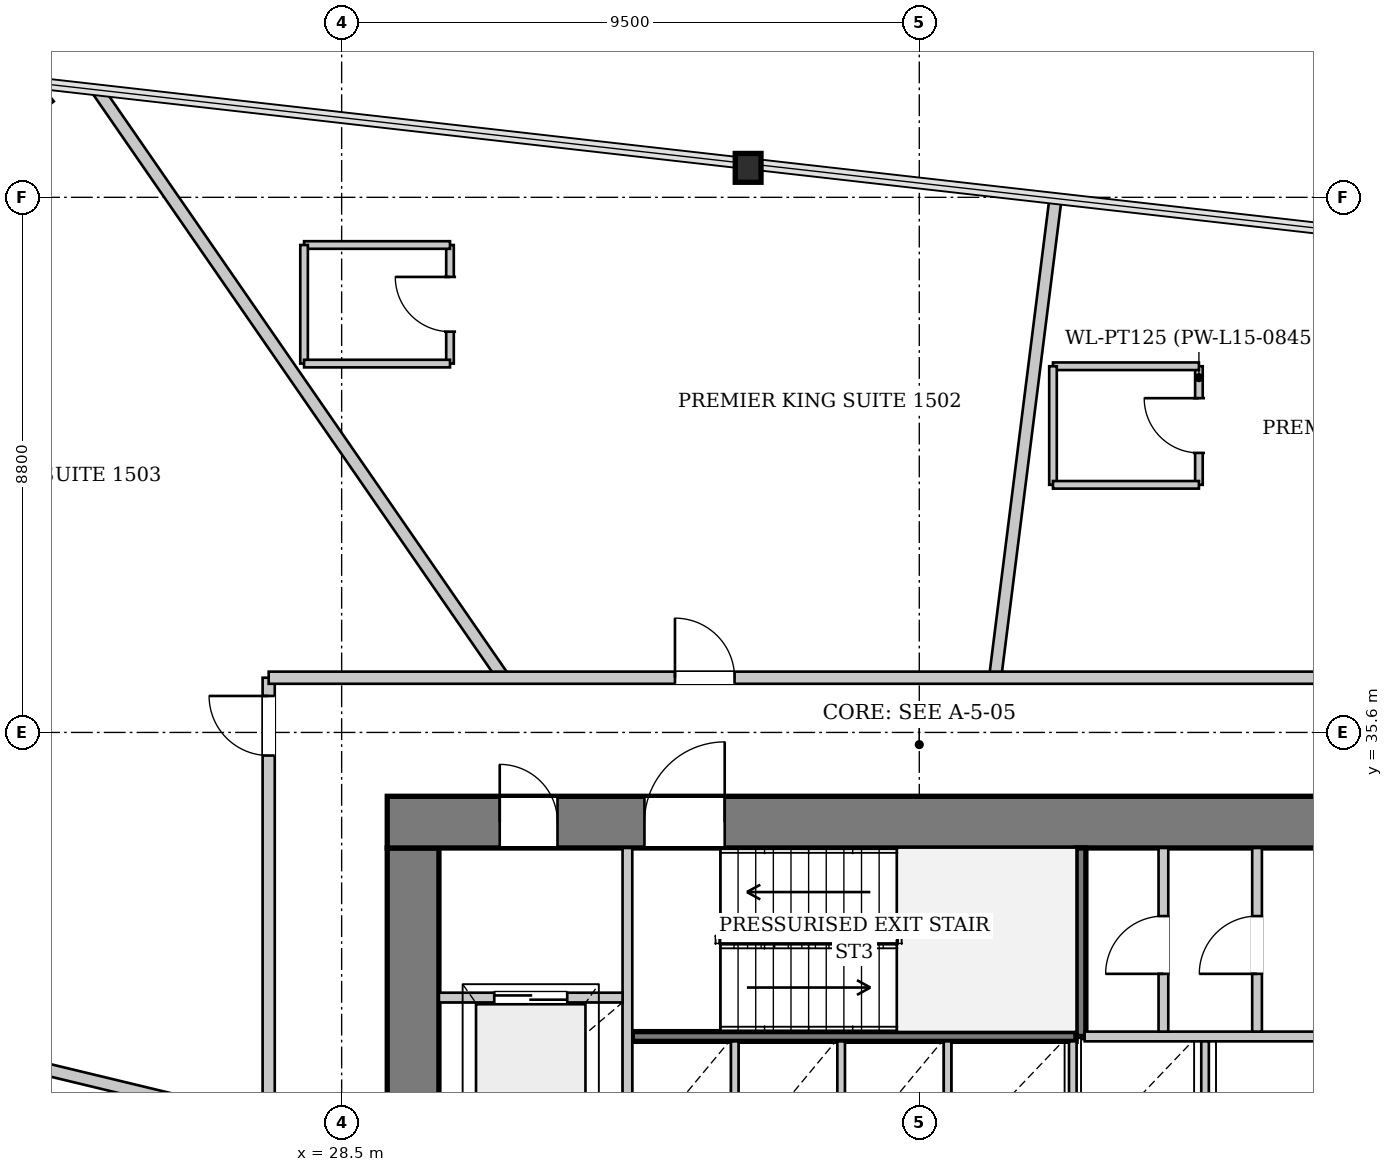
"""IFC4 building model, lengths in metres.
Left out: names, types, materials, properties, quantities, classifications, styles, units other than length and angle.
Written with IfcOpenShell. Run it as: python <this file> out.ifc"""

import sys

from ifc_helpers import new_model, si_unit, direction, frame, frame_2d, origin, origin_2d, place, context, subcontext, project, spatial, rectangle, i_section, extrude, source, transform, mapped, element, fill, save


model = new_model("IFC4")
c1 = context("Model", 3, precision=1e-05, world=origin(), true_north=direction((0.0, 1.0)))
c2 = subcontext(c1, "Body", "Model", "MODEL_VIEW")
j1 = project(units=[si_unit("LENGTHUNIT", "METRE"), si_unit("PLANEANGLEUNIT", "RADIAN")], contexts=[c1])
p1 = place(None, origin())
s1 = spatial("IfcSite", under=j1, at=p1, CompositionType="ELEMENT")
p2 = place(p1, origin())
s2 = spatial("IfcBuilding", under=s1, at=p2, CompositionType="ELEMENT")
p3 = place(p2, frame((0.0, 0.0, 61.25)))
s3 = spatial("IfcBuildingStorey", under=s2, at=p3, CompositionType="ELEMENT", Elevation=61.25)
m1 = source(origin(), c2, "Body", "SweptSolid", [
    extrude(i_section(OverallWidth=0.424, OverallDepth=0.474, WebThickness=0.043, FlangeThickness=0.068, at=origin_2d()), origin(), (0.0, 0.0, 1.0), 3.4),
])
p4 = place(p3, frame((35.336, 44.936, 0.0), z_axis=(-0.088823484201, -0.030373754096, 0.995584162046), x_axis=(0.323561533003, -0.946207130792, 0.0)))
e1 = element("IfcColumn", 1, at=p4, inside=s3, PredefinedType="COLUMN", context=c2, shape_type="MappedRepresentation", body=[
    mapped(m1, transform((0.0, 0.0, 0.0), x_axis=(1.0, 0.0, 0.0), y_axis=(0.0, 1.0, 0.0), z_axis=(0.0, 0.0, 1.0), scale=1.0)),
])
m2 = source(origin(), c2, "Body", "SweptSolid", [
    extrude(i_section(OverallWidth=0.308, OverallDepth=0.814, WebThickness=0.021, FlangeThickness=0.04, at=origin_2d()), origin(), (0.0, 0.0, 1.0), 3.409),
])
p5 = place(p3, frame((23.527, 46.274, 0.0), z_axis=(-0.088944570663, -0.078632156673, 0.99292791646), x_axis=(0.662339568737, -0.749203774473, 0.0)))
e2 = element("IfcColumn", 2, at=p5, inside=s3, PredefinedType="COLUMN", context=c2, shape_type="MappedRepresentation", body=[
    mapped(m2, transform((0.0, 0.0, 0.0), x_axis=(1.0, 0.0, 0.0), y_axis=(0.0, 1.0, 0.0), z_axis=(0.0, 0.0, 1.0), scale=1.0)),
])
p6 = place(p3, frame((18.817, 42.229, 0.0), z_axis=(0.0, 0.0, 1.0), x_axis=(0.778217687349, 0.627994610722, 0.0)))
e3 = element("IfcWall", 3, at=p6, inside=s3, PredefinedType="SOLIDWALL", context=c2, shape_type="SweptSolid", body=[
    extrude(rectangle(XDim=6.207, YDim=0.38, at=frame_2d((3.103, 0.0))), origin(), (0.0, 0.0, 1.0), 2.592),
])
p7 = place(p3, frame((29.675, 19.5, 0.0), z_axis=(0.0, 0.0, 1.0), x_axis=(0.0, 1.0, 0.0)))
e4 = element("IfcWall", 4, at=p7, inside=s3, PredefinedType="SHEAR", context=c2, shape_type="SweptSolid", body=[
    extrude(rectangle(XDim=14.2, YDim=0.85, at=frame_2d((7.1, 0.0))), origin(), (0.0, 0.0, 1.0), 3.3),
])
p8 = place(p7, frame((7.42, 0.0, 0.0)))
e5 = element("IfcOpeningElement", 5, at=p8, cuts=e4, PredefinedType="OPENING", context=c2, shape_type="SweptSolid", body=[
    extrude(rectangle(XDim=1.6, YDim=2.2, at=frame_2d((0.8, 1.1))), frame((0.0, 0.435, 0.0), z_axis=(0.0, -1.0, 0.0), x_axis=(1.0, 0.0, 0.0)), (0.0, 0.0, 1.0), 0.87),
])
p9 = place(p3, frame((29.25, 34.125, 0.0), z_axis=(0.0, 0.0, 1.0), x_axis=(1.0, 0.0, 0.0)))
e6 = element("IfcWall", 6, at=p9, inside=s3, PredefinedType="SHEAR", context=c2, shape_type="SweptSolid", body=[
    extrude(rectangle(XDim=17.5, YDim=0.85, at=frame_2d((8.75, 0.0))), origin(), (0.0, 0.0, 1.0), 3.3),
])
p10 = place(p9, frame((1.85, 0.0, 0.0)))
e7 = element("IfcOpeningElement", 7, at=p10, cuts=e6, PredefinedType="OPENING", context=c2, shape_type="SweptSolid", body=[
    extrude(rectangle(XDim=0.95, YDim=2.1, at=frame_2d((0.475, 1.05))), frame((0.0, 0.435, 0.0), z_axis=(0.0, -1.0, 0.0), x_axis=(1.0, 0.0, 0.0)), (0.0, 0.0, 1.0), 0.87),
])
p11 = place(p9, frame((4.23, 0.0, 0.0)))
e8 = element("IfcOpeningElement", 8, at=p11, cuts=e6, PredefinedType="OPENING", context=c2, shape_type="SweptSolid", body=[
    extrude(rectangle(XDim=1.32, YDim=2.2, at=frame_2d((0.66, 1.1))), frame((0.0, 0.435, 0.0), z_axis=(0.0, -1.0, 0.0), x_axis=(1.0, 0.0, 0.0)), (0.0, 0.0, 1.0), 0.87),
])
p12 = place(p9, frame((15.3, 0.0, 0.0)))
e9 = element("IfcOpeningElement", 9, at=p12, cuts=e6, PredefinedType="OPENING", context=c2, shape_type="SweptSolid", body=[
    extrude(rectangle(XDim=0.95, YDim=2.1, at=frame_2d((0.475, 1.05))), frame((0.0, 0.435, 0.0), z_axis=(0.0, -1.0, 0.0), x_axis=(1.0, 0.0, 0.0)), (0.0, 0.0, 1.0), 0.87),
])
p13 = place(p3, frame((33.28, 30.6, 0.0), z_axis=(0.0, 0.0, 1.0), x_axis=(1.0, 0.0, 0.0)))
e10 = element("IfcWall", 10, at=p13, inside=s3, PredefinedType="PARTITIONING", context=c2, shape_type="SweptSolid", body=[
    extrude(rectangle(XDim=7.3, YDim=0.16, at=frame_2d((3.65, 0.0))), origin(), (0.0, 0.0, 1.0), 3.3),
])
p14 = place(p3, frame((40.66, 30.6, 0.0), z_axis=(0.0, 0.0, 1.0), x_axis=(0.0, 1.0, 0.0)))
e11 = element("IfcWall", 11, at=p14, inside=s3, PredefinedType="PARTITIONING", context=c2, shape_type="SweptSolid", body=[
    extrude(rectangle(XDim=3.1, YDim=0.16, at=frame_2d((1.55, 0.0))), origin(), (0.0, 0.0, 1.0), 3.3),
])
p15 = place(p3, frame((33.2, 28.44, 0.0), z_axis=(0.0, 0.0, 1.0), x_axis=(0.0, 1.0, 0.0)))
e12 = element("IfcWall", 12, at=p15, inside=s3, PredefinedType="PARTITIONING", context=c2, shape_type="SweptSolid", body=[
    extrude(rectangle(XDim=5.26, YDim=0.16, at=frame_2d((2.63, 0.0))), origin(), (0.0, 0.0, 1.0), 3.3),
])
p16 = place(p3, frame((30.1, 31.24, 0.0), z_axis=(0.0, 0.0, 1.0), x_axis=(1.0, 0.0, 0.0)))
e13 = element("IfcWall", 13, at=p16, inside=s3, PredefinedType="PARTITIONING", context=c2, shape_type="SweptSolid", body=[
    extrude(rectangle(XDim=3.02, YDim=0.16, at=frame_2d((1.51, 0.0))), origin(), (0.0, 0.0, 1.0), 3.3),
])
p17 = place(p16, frame((0.91, 0.0, 0.0)))
e14 = element("IfcOpeningElement", 14, at=p17, cuts=e13, PredefinedType="OPENING", context=c2, shape_type="SweptSolid", body=[
    extrude(rectangle(XDim=1.2, YDim=2.2, at=frame_2d((0.6, 1.1))), frame((0.0, 0.09, 0.0), z_axis=(0.0, -1.0, 0.0), x_axis=(1.0, 0.0, 0.0)), (0.0, 0.0, 1.0), 0.18),
])
p18 = place(p3, frame((40.72, 30.6, 0.0), z_axis=(0.0, 0.0, 1.0), x_axis=(1.0, 0.0, 0.0)))
e15 = element("IfcWall", 15, at=p18, inside=s3, PredefinedType="PARTITIONING", context=c2, shape_type="SweptSolid", body=[
    extrude(rectangle(XDim=5.18, YDim=0.16, at=frame_2d((2.59, 0.0))), origin(), (0.0, 0.0, 1.0), 3.3),
])
for number, where, z_axis, x_axis in (
    (16, (34.965, 28.6, 0.0), (0.0, 0.0, 1.0), (0.0, 1.0, 0.0)),
    (17, (36.715, 28.6, 0.0), (0.0, 0.0, 1.0), (0.0, 1.0, 0.0)),
    (18, (38.465, 28.6, 0.0), (0.0, 0.0, 1.0), (0.0, 1.0, 0.0)),
    (19, (40.525, 28.6, 0.0), (0.0, 0.0, 1.0), (0.0, 1.0, 0.0)),
    (20, (42.7, 28.6, 0.0), (0.0, 0.0, 1.0), (0.0, 1.0, 0.0)),
):
    element("IfcWall", number, at=place(p3, frame(where, z_axis=z_axis, x_axis=x_axis)), inside=s3, PredefinedType="PARTITIONING", context=c2, shape_type="SweptSolid", body=[
        extrude(rectangle(XDim=1.92, YDim=0.125, at=frame_2d((0.96, 0.0))), origin(), (0.0, 0.0, 1.0), 3.3),
    ])
p19 = place(p3, frame((42.015, 30.68, 0.0), z_axis=(0.0, 0.0, 1.0), x_axis=(0.0, 1.0, 0.0)))
e21 = element("IfcWall", 21, at=p19, inside=s3, PredefinedType="PARTITIONING", context=c2, shape_type="SweptSolid", body=[
    extrude(rectangle(XDim=3.02, YDim=0.16, at=frame_2d((1.51, 0.0))), origin(), (0.0, 0.0, 1.0), 3.3),
])
p20 = place(p19, frame((0.95, 0.0, 0.0)))
e22 = element("IfcOpeningElement", 22, at=p20, cuts=e21, PredefinedType="OPENING", context=c2, shape_type="SweptSolid", body=[
    extrude(rectangle(XDim=0.95, YDim=2.1, at=frame_2d((0.475, 1.05))), frame((0.0, 0.09, 0.0), z_axis=(0.0, -1.0, 0.0), x_axis=(1.0, 0.0, 0.0)), (0.0, 0.0, 1.0), 0.18),
])
p21 = place(p3, frame((43.555, 30.68, 0.0), z_axis=(0.0, 0.0, 1.0), x_axis=(0.0, 1.0, 0.0)))
e23 = element("IfcWall", 23, at=p21, inside=s3, PredefinedType="PARTITIONING", context=c2, shape_type="SweptSolid", body=[
    extrude(rectangle(XDim=3.02, YDim=0.16, at=frame_2d((1.51, 0.0))), origin(), (0.0, 0.0, 1.0), 3.3),
])
p22 = place(p21, frame((0.95, 0.0, 0.0)))
e24 = element("IfcOpeningElement", 24, at=p22, cuts=e23, PredefinedType="OPENING", context=c2, shape_type="SweptSolid", body=[
    extrude(rectangle(XDim=0.95, YDim=2.1, at=frame_2d((0.475, 1.05))), frame((0.0, 0.09, 0.0), z_axis=(0.0, -1.0, 0.0), x_axis=(1.0, 0.0, 0.0)), (0.0, 0.0, 1.0), 0.18),
])
p23 = place(p3, frame((39.248, 36.5, 0.0), z_axis=(0.0, 0.0, 1.0), x_axis=(0.125018186773, 0.992154450162, 0.0)))
e25 = element("IfcWall", 25, at=p23, inside=s3, PredefinedType="PARTITIONING", context=c2, shape_type="SweptSolid", body=[
    extrude(rectangle(XDim=7.913, YDim=0.2, at=frame_2d((3.957, 0.0))), origin(), (0.0, 0.0, 1.0), 3.3),
])
p24 = place(p3, frame((31.161, 36.5, 0.0), z_axis=(0.0, 0.0, 1.0), x_axis=(-0.568362835672, 0.822778030229, 0.0)))
e26 = element("IfcWall", 26, at=p24, inside=s3, PredefinedType="PARTITIONING", context=c2, shape_type="SweptSolid", body=[
    extrude(rectangle(XDim=11.708, YDim=0.2, at=frame_2d((5.854, 0.0))), origin(), (0.0, 0.0, 1.0), 3.3),
])
p25 = place(p3, frame((27.3, 29.178, 0.0), z_axis=(0.0, 0.0, 1.0), x_axis=(-0.972184679764, 0.234215602453, 0.0)))
e27 = element("IfcWall", 27, at=p25, inside=s3, PredefinedType="PARTITIONING", context=c2, shape_type="SweptSolid", body=[
    extrude(rectangle(XDim=10.541, YDim=0.2, at=frame_2d((5.27, 0.0))), origin(), (0.0, 0.0, 1.0), 3.3),
])
p26 = place(p3, frame((42.599, 39.672, 0.0), z_axis=(0.0, 0.0, 1.0), x_axis=(0.0, 1.0, 0.0)))
e28 = element("IfcWall", 28, at=p26, inside=s3, PredefinedType="PARTITIONING", context=c2, shape_type="SweptSolid", body=[
    extrude(rectangle(XDim=1.95, YDim=0.125, at=frame_2d((0.975, 0.0))), origin(), (0.0, 0.0, 1.0), 3.3),
])
p27 = place(p26, frame((0.525, 0.0, 0.0)))
e29 = element("IfcOpeningElement", 29, at=p27, cuts=e28, PredefinedType="OPENING", context=c2, shape_type="SweptSolid", body=[
    extrude(rectangle(XDim=0.9, YDim=2.1, at=frame_2d((0.45, 1.05))), frame((0.0, 0.073, 0.0), z_axis=(0.0, -1.0, 0.0), x_axis=(1.0, 0.0, 0.0)), (0.0, 0.0, 1.0), 0.145),
])
p28 = place(p3, frame((42.599, 41.622, 0.0), z_axis=(0.0, 0.0, 1.0), x_axis=(-1.0, 0.0, 0.0)))
e30 = element("IfcWall", 30, at=p28, inside=s3, PredefinedType="PARTITIONING", context=c2, shape_type="SweptSolid", body=[
    extrude(rectangle(XDim=2.4, YDim=0.125, at=frame_2d((1.2, 0.0))), origin(), (0.0, 0.0, 1.0), 3.3),
])
p29 = place(p3, frame((40.199, 41.622, 0.0), z_axis=(0.0, 0.0, 1.0), x_axis=(0.0, -1.0, 0.0)))
e31 = element("IfcWall", 31, at=p29, inside=s3, PredefinedType="PARTITIONING", context=c2, shape_type="SweptSolid", body=[
    extrude(rectangle(XDim=1.95, YDim=0.125, at=frame_2d((0.975, 0.0))), origin(), (0.0, 0.0, 1.0), 3.3),
])
p30 = place(p3, frame((40.199, 39.672, 0.0), z_axis=(0.0, 0.0, 1.0), x_axis=(1.0, 0.0, 0.0)))
e32 = element("IfcWall", 32, at=p30, inside=s3, PredefinedType="PARTITIONING", context=c2, shape_type="SweptSolid", body=[
    extrude(rectangle(XDim=2.4, YDim=0.125, at=frame_2d((1.2, 0.0))), origin(), (0.0, 0.0, 1.0), 3.3),
])
p31 = place(p3, frame((30.282, 41.666, 0.0), z_axis=(0.0, 0.0, 1.0), x_axis=(0.0, 1.0, 0.0)))
e33 = element("IfcWall", 33, at=p31, inside=s3, PredefinedType="PARTITIONING", context=c2, shape_type="SweptSolid", body=[
    extrude(rectangle(XDim=1.95, YDim=0.125, at=frame_2d((0.975, 0.0))), origin(), (0.0, 0.0, 1.0), 3.3),
])
p32 = place(p31, frame((0.525, 0.0, 0.0)))
e34 = element("IfcOpeningElement", 34, at=p32, cuts=e33, PredefinedType="OPENING", context=c2, shape_type="SweptSolid", body=[
    extrude(rectangle(XDim=0.9, YDim=2.1, at=frame_2d((0.45, 1.05))), frame((0.0, 0.073, 0.0), z_axis=(0.0, -1.0, 0.0), x_axis=(1.0, 0.0, 0.0)), (0.0, 0.0, 1.0), 0.145),
])
p33 = place(p3, frame((30.282, 43.616, 0.0), z_axis=(0.0, 0.0, 1.0), x_axis=(-1.0, 0.0, 0.0)))
e35 = element("IfcWall", 35, at=p33, inside=s3, PredefinedType="PARTITIONING", context=c2, shape_type="SweptSolid", body=[
    extrude(rectangle(XDim=2.4, YDim=0.125, at=frame_2d((1.2, 0.0))), origin(), (0.0, 0.0, 1.0), 3.3),
])
p34 = place(p3, frame((27.882, 43.616, 0.0), z_axis=(0.0, 0.0, 1.0), x_axis=(0.0, -1.0, 0.0)))
e36 = element("IfcWall", 36, at=p34, inside=s3, PredefinedType="PARTITIONING", context=c2, shape_type="SweptSolid", body=[
    extrude(rectangle(XDim=1.95, YDim=0.125, at=frame_2d((0.975, 0.0))), origin(), (0.0, 0.0, 1.0), 3.3),
])
p35 = place(p3, frame((27.882, 41.666, 0.0), z_axis=(0.0, 0.0, 1.0), x_axis=(1.0, 0.0, 0.0)))
e37 = element("IfcWall", 37, at=p35, inside=s3, PredefinedType="PARTITIONING", context=c2, shape_type="SweptSolid", body=[
    extrude(rectangle(XDim=2.4, YDim=0.125, at=frame_2d((1.2, 0.0))), origin(), (0.0, 0.0, 1.0), 3.3),
])
p36 = place(p3, frame((27.3, 16.7, 0.0), z_axis=(0.0, 0.0, 1.0), x_axis=(0.0, 1.0, 0.0)))
e38 = element("IfcWall", 38, at=p36, inside=s3, PredefinedType="PARTITIONING", context=c2, shape_type="SweptSolid", body=[
    extrude(rectangle(XDim=19.8, YDim=0.2, at=frame_2d((9.9, 0.0))), origin(), (0.0, 0.0, 1.0), 3.3),
])
p37 = place(p36, frame((18.52, 0.0, 0.0)))
e39 = element("IfcOpeningElement", 39, at=p37, cuts=e38, PredefinedType="OPENING", context=c2, shape_type="SweptSolid", body=[
    extrude(rectangle(XDim=0.98, YDim=2.15, at=frame_2d((0.49, 1.075))), frame((0.0, 0.11, 0.0), z_axis=(0.0, -1.0, 0.0), x_axis=(1.0, 0.0, 0.0)), (0.0, 0.0, 1.0), 0.22),
])
p38 = place(p36, frame((9.047, 0.0, 0.0)))
e40 = element("IfcOpeningElement", 40, at=p38, cuts=e38, PredefinedType="OPENING", context=c2, shape_type="SweptSolid", body=[
    extrude(rectangle(XDim=0.98, YDim=2.15, at=frame_2d((0.49, 1.075))), frame((0.0, 0.11, 0.0), z_axis=(0.0, -1.0, 0.0), x_axis=(1.0, 0.0, 0.0)), (0.0, 0.0, 1.0), 0.22),
])
p39 = place(p36, frame((0.3, 0.0, 0.0)))
e41 = element("IfcOpeningElement", 41, at=p39, cuts=e38, PredefinedType="OPENING", context=c2, shape_type="SweptSolid", body=[
    extrude(rectangle(XDim=0.98, YDim=2.15, at=frame_2d((0.49, 1.075))), frame((0.0, 0.11, 0.0), z_axis=(0.0, -1.0, 0.0), x_axis=(1.0, 0.0, 0.0)), (0.0, 0.0, 1.0), 0.22),
])
p40 = place(p3, frame((27.3, 36.5, 0.0), z_axis=(0.0, 0.0, 1.0), x_axis=(1.0, 0.0, 0.0)))
e42 = element("IfcWall", 42, at=p40, inside=s3, PredefinedType="PARTITIONING", context=c2, shape_type="SweptSolid", body=[
    extrude(rectangle(XDim=21.4, YDim=0.2, at=frame_2d((10.7, 0.0))), origin(), (0.0, 0.0, 1.0), 3.3),
])
p41 = place(p40, frame((19.414, 0.0, 0.0)))
e43 = element("IfcOpeningElement", 43, at=p41, cuts=e42, PredefinedType="OPENING", context=c2, shape_type="SweptSolid", body=[
    extrude(rectangle(XDim=0.98, YDim=2.15, at=frame_2d((0.49, 1.075))), frame((0.0, 0.11, 0.0), z_axis=(0.0, -1.0, 0.0), x_axis=(1.0, 0.0, 0.0)), (0.0, 0.0, 1.0), 0.22),
])
p42 = place(p40, frame((6.682, 0.0, 0.0)))
e44 = element("IfcOpeningElement", 44, at=p42, cuts=e42, PredefinedType="OPENING", context=c2, shape_type="SweptSolid", body=[
    extrude(rectangle(XDim=0.98, YDim=2.15, at=frame_2d((0.49, 1.075))), frame((0.0, 0.11, 0.0), z_axis=(0.0, -1.0, 0.0), x_axis=(1.0, 0.0, 0.0)), (0.0, 0.0, 1.0), 0.22),
])
m3 = source(origin(), c2, "Body", "SweptSolid", [
    extrude(rectangle(XDim=0.95, YDim=2.1, at=frame_2d((0.475, 1.05))), frame((0.0, 0.025, 0.0), z_axis=(0.0, -1.0, 0.0), x_axis=(1.0, 0.0, 0.0)), (0.0, 0.0, 1.0), 0.05),
])
p43 = place(p10, origin())
e45 = element("IfcDoor", 45, at=p43, inside=s3, OperationType="SINGLE_SWING_LEFT", PredefinedType="DOOR", context=c2, shape_type="MappedRepresentation", body=[
    mapped(m3, transform((0.0, 0.0, 0.0), x_axis=(1.0, 0.0, 0.0), y_axis=(0.0, 1.0, 0.0), z_axis=(0.0, 0.0, 1.0), scale=1.0)),
])
fill(e7, e45)
m4 = source(origin(), c2, "Body", "SweptSolid", [
    extrude(rectangle(XDim=1.32, YDim=2.2, at=frame_2d((0.66, 1.1))), frame((0.0, 0.025, 0.0), z_axis=(0.0, -1.0, 0.0), x_axis=(1.0, 0.0, 0.0)), (0.0, 0.0, 1.0), 0.05),
])
p44 = place(p11, origin())
e46 = element("IfcDoor", 46, at=p44, inside=s3, OperationType="SINGLE_SWING_RIGHT", PredefinedType="DOOR", context=c2, shape_type="MappedRepresentation", body=[
    mapped(m4, transform((0.0, 0.0, 0.0), x_axis=(1.0, 0.0, 0.0), y_axis=(0.0, 1.0, 0.0), z_axis=(0.0, 0.0, 1.0), scale=1.0)),
])
fill(e8, e46)
m5 = source(origin(), c2, "Body", "SweptSolid", [
    extrude(rectangle(XDim=1.2, YDim=2.2, at=frame_2d((0.6, 1.1))), frame((0.0, 0.025, 0.0), z_axis=(0.0, -1.0, 0.0), x_axis=(1.0, 0.0, 0.0)), (0.0, 0.0, 1.0), 0.05),
])
p45 = place(p17, origin())
e47 = element("IfcDoor", 47, at=p45, inside=s3, OperationType="DOUBLE_DOOR_SLIDING", PredefinedType="DOOR", context=c2, shape_type="MappedRepresentation", body=[
    mapped(m5, transform((0.0, 0.0, 0.0), x_axis=(1.0, 0.0, 0.0), y_axis=(0.0, 1.0, 0.0), z_axis=(0.0, 0.0, 1.0), scale=1.0)),
])
fill(e14, e47)
p46 = place(p20, origin())
e48 = element("IfcDoor", 48, at=p46, inside=s3, OperationType="SINGLE_SWING_LEFT", PredefinedType="DOOR", context=c2, shape_type="MappedRepresentation", body=[
    mapped(m3, transform((0.0, 0.0, 0.0), x_axis=(1.0, 0.0, 0.0), y_axis=(0.0, 1.0, 0.0), z_axis=(0.0, 0.0, 1.0), scale=1.0)),
])
fill(e22, e48)
p47 = place(p22, origin())
e49 = element("IfcDoor", 49, at=p47, inside=s3, OperationType="SINGLE_SWING_LEFT", PredefinedType="DOOR", context=c2, shape_type="MappedRepresentation", body=[
    mapped(m3, transform((0.0, 0.0, 0.0), x_axis=(1.0, 0.0, 0.0), y_axis=(0.0, 1.0, 0.0), z_axis=(0.0, 0.0, 1.0), scale=1.0)),
])
fill(e24, e49)
m6 = source(origin(), c2, "Body", "SweptSolid", [
    extrude(rectangle(XDim=0.9, YDim=2.1, at=frame_2d((0.45, 1.05))), frame((0.0, 0.025, 0.0), z_axis=(0.0, -1.0, 0.0), x_axis=(1.0, 0.0, 0.0)), (0.0, 0.0, 1.0), 0.05),
])
p48 = place(p27, origin())
e50 = element("IfcDoor", 50, at=p48, inside=s3, OperationType="SINGLE_SWING_RIGHT", PredefinedType="DOOR", context=c2, shape_type="MappedRepresentation", body=[
    mapped(m6, transform((0.0, 0.0, 0.0), x_axis=(1.0, 0.0, 0.0), y_axis=(0.0, 1.0, 0.0), z_axis=(0.0, 0.0, 1.0), scale=1.0)),
])
fill(e29, e50)
p49 = place(p32, origin())
e51 = element("IfcDoor", 51, at=p49, inside=s3, OperationType="SINGLE_SWING_RIGHT", PredefinedType="DOOR", context=c2, shape_type="MappedRepresentation", body=[
    mapped(m6, transform((0.0, 0.0, 0.0), x_axis=(1.0, 0.0, 0.0), y_axis=(0.0, 1.0, 0.0), z_axis=(0.0, 0.0, 1.0), scale=1.0)),
])
fill(e34, e51)
m7 = source(origin(), c2, "Body", "SweptSolid", [
    extrude(rectangle(XDim=0.98, YDim=2.15, at=frame_2d((0.49, 1.075))), frame((0.0, 0.025, 0.0), z_axis=(0.0, -1.0, 0.0), x_axis=(1.0, 0.0, 0.0)), (0.0, 0.0, 1.0), 0.05),
])
p50 = place(p37, origin())
e52 = element("IfcDoor", 52, at=p50, inside=s3, OperationType="SINGLE_SWING_RIGHT", PredefinedType="DOOR", context=c2, shape_type="MappedRepresentation", body=[
    mapped(m7, transform((0.0, 0.0, 0.0), x_axis=(1.0, 0.0, 0.0), y_axis=(0.0, 1.0, 0.0), z_axis=(0.0, 0.0, 1.0), scale=1.0)),
])
fill(e39, e52)
p51 = place(p42, origin())
e53 = element("IfcDoor", 53, at=p51, inside=s3, OperationType="SINGLE_SWING_LEFT", PredefinedType="DOOR", context=c2, shape_type="MappedRepresentation", body=[
    mapped(m7, transform((0.0, 0.0, 0.0), x_axis=(1.0, 0.0, 0.0), y_axis=(0.0, 1.0, 0.0), z_axis=(0.0, 0.0, 1.0), scale=1.0)),
])
fill(e44, e53)
save(model, sys.argv[1])
